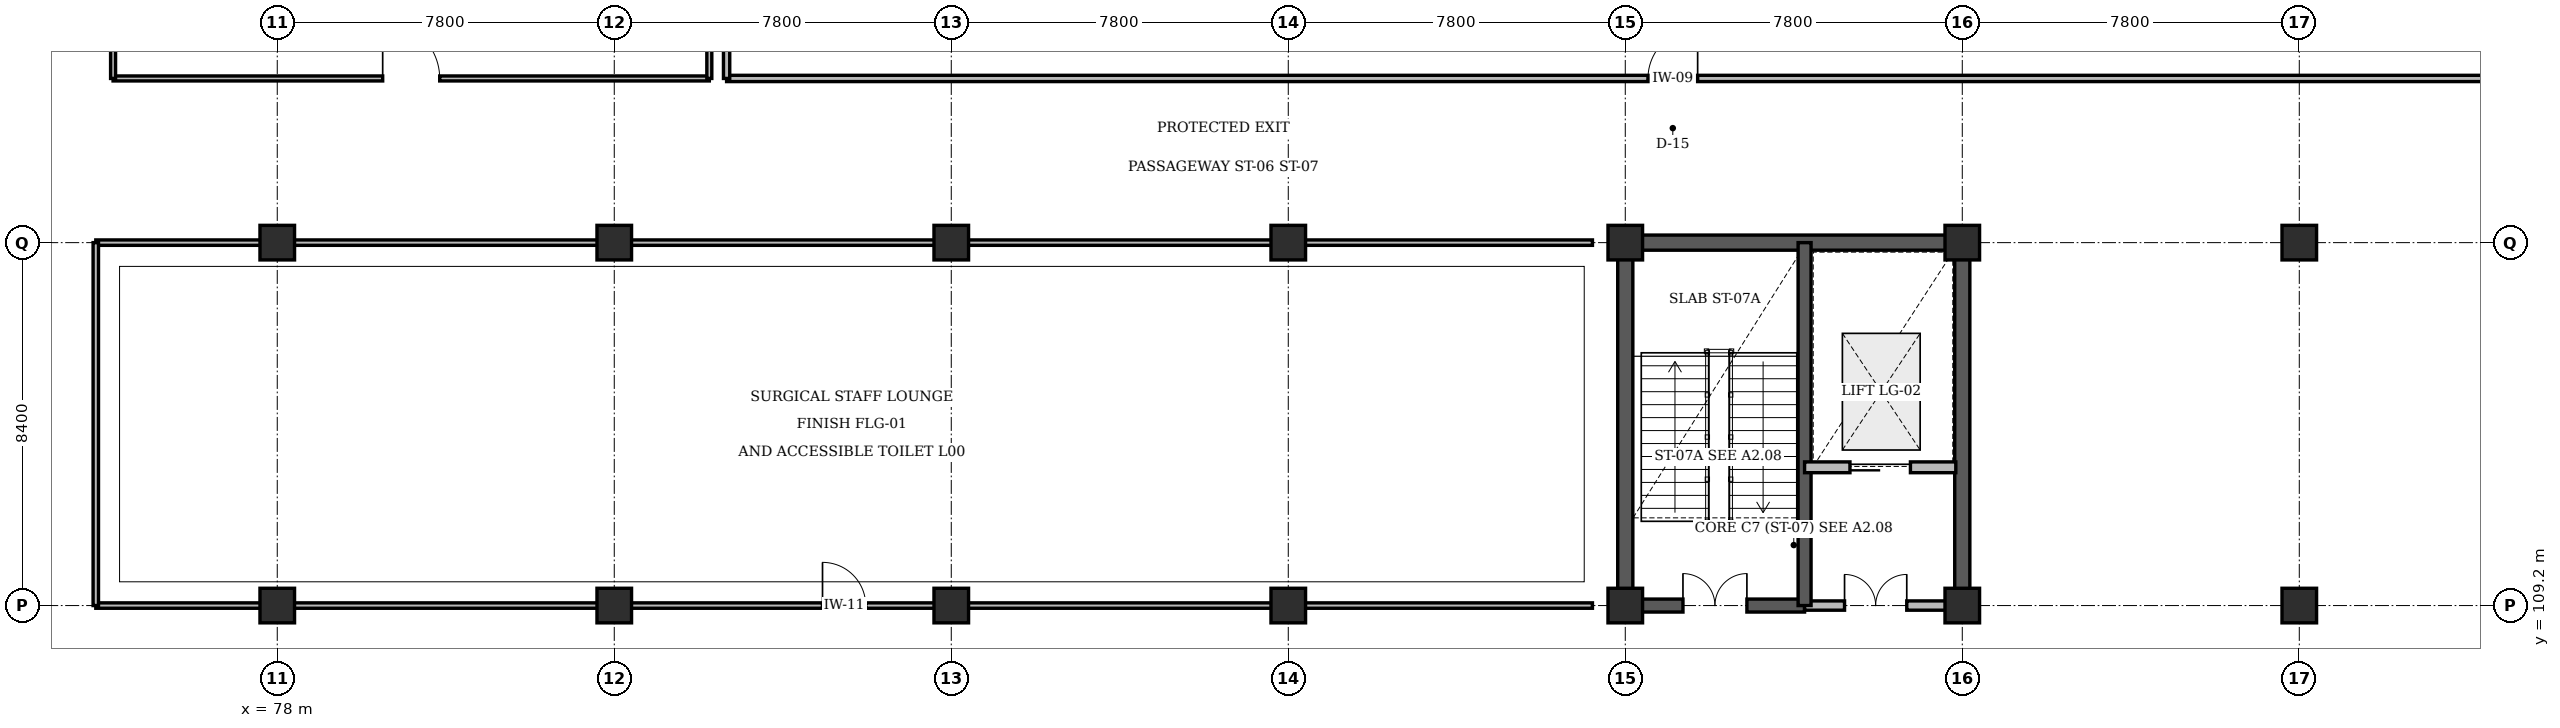
"""IFC4 building model, lengths in metres.
Left out: names, types, materials, properties, quantities, classifications, styles, units other than length and angle.
Written with IfcOpenShell. Run it as: python <this file> out.ifc"""

import sys

from ifc_helpers import new_model, si_unit, direction, frame, frame_2d, origin, origin_2d, place, context, subcontext, project, spatial, rectangle, extrude, element, fill, save


model = new_model("IFC4")
c1 = context("Model", 3, precision=1e-05, world=origin(), true_north=direction((0.0, 1.0)))
c2 = subcontext(c1, "Body", "Model", "MODEL_VIEW")
j1 = project(units=[si_unit("LENGTHUNIT", "METRE"), si_unit("PLANEANGLEUNIT", "RADIAN")], contexts=[c1])
p1 = place(None, origin())
s1 = spatial("IfcSite", under=j1, at=p1, CompositionType="ELEMENT")
p2 = place(p1, origin())
s2 = spatial("IfcBuilding", under=s1, at=p2, CompositionType="ELEMENT")
p3 = place(p2, origin())
s3 = spatial("IfcBuildingStorey", under=s2, at=p3, CompositionType="ELEMENT", Elevation=0.0)
p4 = place(p3, frame((109.025, 117.6, 0.0), z_axis=(0.0, 0.0, 1.0), x_axis=(1.0, 0.0, 0.0)))
e1 = element("IfcWall", 1, at=p4, inside=s3, PredefinedType="SHEAR", context=c2, shape_type="SweptSolid", body=[
    extrude(rectangle(XDim=8.15, YDim=0.35, at=frame_2d((4.075, 0.0))), origin(), (0.0, 0.0, 1.0), 4.48),
])
for number, where, z_axis, x_axis in (
    (2, (109.2, 109.2, 0.0), (0.0, 0.0, 1.0), (0.0, 1.0, 0.0)),
    (3, (117.0, 109.2, 0.0), (0.0, 0.0, 1.0), (0.0, 1.0, 0.0)),
):
    element("IfcWall", number, at=place(p3, frame(where, z_axis=z_axis, x_axis=x_axis)), inside=s3, PredefinedType="SHEAR", context=c2, shape_type="SweptSolid", body=[
        extrude(rectangle(XDim=8.4, YDim=0.35, at=frame_2d((4.2, 0.0))), origin(), (0.0, 0.0, 1.0), 4.48),
    ])
for number, where, z_axis, x_axis in (
    (4, (78.0, 109.2, 0.0), (0.0, 0.0, 1.0), (1.0, 0.0, 0.0)),
    (5, (78.0, 117.6, 0.0), (0.0, 0.0, 1.0), (1.0, 0.0, 0.0)),
    (6, (85.8, 109.2, 0.0), (0.0, 0.0, 1.0), (1.0, 0.0, 0.0)),
    (7, (85.8, 117.6, 0.0), (0.0, 0.0, 1.0), (1.0, 0.0, 0.0)),
    (8, (93.6, 109.2, 0.0), (0.0, 0.0, 1.0), (1.0, 0.0, 0.0)),
    (9, (93.6, 117.6, 0.0), (0.0, 0.0, 1.0), (1.0, 0.0, 0.0)),
    (10, (101.4, 109.2, 0.0), (0.0, 0.0, 1.0), (1.0, 0.0, 0.0)),
    (11, (101.4, 117.6, 0.0), (0.0, 0.0, 1.0), (1.0, 0.0, 0.0)),
    (12, (109.2, 109.2, 0.0), (0.0, 0.0, 1.0), (1.0, 0.0, 0.0)),
    (13, (109.2, 117.6, 0.0), (0.0, 0.0, 1.0), (1.0, 0.0, 0.0)),
    (14, (117.0, 109.2, 0.0), (0.0, 0.0, 1.0), (1.0, 0.0, 0.0)),
    (15, (117.0, 117.6, 0.0), (0.0, 0.0, 1.0), (1.0, 0.0, 0.0)),
    (16, (124.8, 109.2, 0.0), (0.0, 0.0, 1.0), (1.0, 0.0, 0.0)),
    (17, (124.8, 117.6, 0.0), (0.0, 0.0, 1.0), (1.0, 0.0, 0.0)),
):
    element("IfcColumn", number, at=place(p3, frame(where, z_axis=z_axis, x_axis=x_axis)), inside=s3, PredefinedType="COLUMN", context=c2, shape_type="SweptSolid", body=[
        extrude(rectangle(XDim=0.8, YDim=0.8, at=origin_2d()), origin(), (0.0, 0.0, 1.0), 4.8),
    ])
p5 = place(p3, frame((109.2, 109.2, 0.0), z_axis=(0.0, 0.0, 1.0), x_axis=(1.0, 0.0, 0.0)))
e18 = element("IfcWall", 18, at=p5, inside=s3, PredefinedType="SHEAR", context=c2, shape_type="SweptSolid", body=[
    extrude(rectangle(XDim=4.15, YDim=0.3, at=frame_2d((2.075, 0.0))), origin(), (0.0, 0.0, 1.0), 4.8),
])
p6 = place(p5, frame((1.335, 0.0, 0.0)))
e19 = element("IfcOpeningElement", 19, at=p6, cuts=e18, PredefinedType="OPENING", context=c2, shape_type="SweptSolid", body=[
    extrude(rectangle(XDim=1.48, YDim=2.2, at=frame_2d((0.74, 1.1))), frame((0.0, 0.16, 0.0), z_axis=(0.0, -1.0, 0.0), x_axis=(1.0, 0.0, 0.0)), (0.0, 0.0, 1.0), 0.32),
])
p7 = place(p3, frame((113.35, 109.2, 0.0), z_axis=(0.0, 0.0, 1.0), x_axis=(1.0, 0.0, 0.0)))
e20 = element("IfcWall", 20, at=p7, inside=s3, PredefinedType="STANDARD", context=c2, shape_type="SweptSolid", body=[
    extrude(rectangle(XDim=3.29, YDim=0.215, at=frame_2d((1.645, 0.0))), origin(), (0.0, 0.0, 1.0), 3.63),
])
p8 = place(p7, frame((0.925, 0.0, 0.0)))
e21 = element("IfcOpeningElement", 21, at=p8, cuts=e20, PredefinedType="OPENING", context=c2, shape_type="SweptSolid", body=[
    extrude(rectangle(XDim=1.44, YDim=2.2, at=frame_2d((0.72, 1.1))), frame((0.0, 0.118, 0.0), z_axis=(0.0, -1.0, 0.0), x_axis=(1.0, 0.0, 0.0)), (0.0, 0.0, 1.0), 0.235),
])
p9 = place(p3, frame((113.35, 109.2, 0.0), z_axis=(0.0, 0.0, 1.0), x_axis=(0.0, 1.0, 0.0)))
e22 = element("IfcWall", 22, at=p9, inside=s3, PredefinedType="SHEAR", context=c2, shape_type="SweptSolid", body=[
    extrude(rectangle(XDim=8.4, YDim=0.3, at=frame_2d((4.2, 0.0))), origin(), (0.0, 0.0, 1.0), 4.8),
])
p10 = place(p3, frame((113.35, 112.4, 0.0), z_axis=(0.0, 0.0, 1.0), x_axis=(1.0, 0.0, 0.0)))
e23 = element("IfcWall", 23, at=p10, inside=s3, PredefinedType="STANDARD", context=c2, shape_type="SweptSolid", body=[
    extrude(rectangle(XDim=3.5, YDim=0.25, at=frame_2d((1.75, 0.0))), origin(), (0.0, 0.0, 1.0), 4.46),
])
p11 = place(p10, frame((1.05, 0.0, 0.0)))
e24 = element("IfcOpeningElement", 24, at=p11, cuts=e23, PredefinedType="OPENING", context=c2, shape_type="SweptSolid", body=[
    extrude(rectangle(XDim=1.4, YDim=2.2, at=frame_2d((0.7, 1.1))), frame((0.0, 0.135, 0.0), z_axis=(0.0, -1.0, 0.0), x_axis=(1.0, 0.0, 0.0)), (0.0, 0.0, 1.0), 0.27),
])
p12 = place(p3, frame((73.8, 109.2, 0.0), z_axis=(0.0, 0.0, 1.0), x_axis=(1.0, 0.0, 0.0)))
e25 = element("IfcWall", 25, at=p12, inside=s3, PredefinedType="PARTITIONING", context=c2, shape_type="SweptSolid", body=[
    extrude(rectangle(XDim=34.64, YDim=0.125, at=frame_2d((17.32, 0.0))), origin(), (0.0, 0.0, 1.0), 3.63),
])
p13 = place(p12, frame((16.82, 0.0, 0.0)))
e26 = element("IfcOpeningElement", 26, at=p13, cuts=e25, PredefinedType="OPENING", context=c2, shape_type="SweptSolid", body=[
    extrude(rectangle(XDim=1.0, YDim=2.1, at=frame_2d((0.5, 1.05))), frame((0.0, 0.073, 0.0), z_axis=(0.0, -1.0, 0.0), x_axis=(1.0, 0.0, 0.0)), (0.0, 0.0, 1.0), 0.145),
])
p14 = place(p3, frame((73.8, 117.6, 0.0), z_axis=(0.0, 0.0, 1.0), x_axis=(1.0, 0.0, 0.0)))
e27 = element("IfcWall", 27, at=p14, inside=s3, PredefinedType="PARTITIONING", context=c2, shape_type="SweptSolid", body=[
    extrude(rectangle(XDim=34.64, YDim=0.125, at=frame_2d((17.32, 0.0))), origin(), (0.0, 0.0, 1.0), 3.63),
])
p15 = place(p3, frame((73.8, 109.2, 0.0), z_axis=(0.0, 0.0, 1.0), x_axis=(0.0, 1.0, 0.0)))
e28 = element("IfcWall", 28, at=p15, inside=s3, PredefinedType="PARTITIONING", context=c2, shape_type="SweptSolid", body=[
    extrude(rectangle(XDim=8.4, YDim=0.125, at=frame_2d((4.2, 0.0))), origin(), (0.0, 0.0, 1.0), 4.46),
])
p16 = place(p3, frame((74.2, 121.4, 0.0), z_axis=(0.0, 0.0, 1.0), x_axis=(1.0, 0.0, 0.0)))
e29 = element("IfcWall", 29, at=p16, inside=s3, PredefinedType="PARTITIONING", context=c2, shape_type="SweptSolid", body=[
    extrude(rectangle(XDim=13.8, YDim=0.115, at=frame_2d((6.9, 0.0))), origin(), (0.0, 0.0, 1.0), 4.46),
])
p17 = place(p16, frame((6.24, 0.0, 0.0)))
e30 = element("IfcOpeningElement", 30, at=p17, cuts=e29, PredefinedType="OPENING", context=c2, shape_type="SweptSolid", body=[
    extrude(rectangle(XDim=1.32, YDim=2.15, at=frame_2d((0.66, 1.075))), frame((0.0, 0.067, 0.0), z_axis=(0.0, -1.0, 0.0), x_axis=(1.0, 0.0, 0.0)), (0.0, 0.0, 1.0), 0.135),
])
for number, where, z_axis, x_axis in (
    (31, (74.2, 121.4, 0.0), (0.0, 0.0, 1.0), (0.0, 1.0, 0.0)),
    (32, (88.0, 121.4, 0.0), (0.0, 0.0, 1.0), (0.0, 1.0, 0.0)),
):
    element("IfcWall", number, at=place(p3, frame(where, z_axis=z_axis, x_axis=x_axis)), inside=s3, PredefinedType="PARTITIONING", context=c2, shape_type="SweptSolid", body=[
        extrude(rectangle(XDim=12.4, YDim=0.115, at=frame_2d((6.2, 0.0))), origin(), (0.0, 0.0, 1.0), 4.46),
    ])
p18 = place(p3, frame((88.4, 121.4, 0.0), z_axis=(0.0, 0.0, 1.0), x_axis=(1.0, 0.0, 0.0)))
e33 = element("IfcWall", 33, at=p18, inside=s3, PredefinedType="PARTITIONING", context=c2, shape_type="SweptSolid", body=[
    extrude(rectangle(XDim=43.8, YDim=0.145, at=frame_2d((21.9, 0.0))), origin(), (0.0, 0.0, 1.0), 4.46),
])
p19 = place(p18, frame((21.325, 0.0, 0.0)))
e34 = element("IfcOpeningElement", 34, at=p19, cuts=e33, PredefinedType="OPENING", context=c2, shape_type="SweptSolid", body=[
    extrude(rectangle(XDim=1.15, YDim=2.15, at=frame_2d((0.575, 1.075))), frame((0.0, 0.083, 0.0), z_axis=(0.0, -1.0, 0.0), x_axis=(1.0, 0.0, 0.0)), (0.0, 0.0, 1.0), 0.165),
])
p20 = place(p3, frame((88.4, 121.4, 0.0), z_axis=(0.0, 0.0, 1.0), x_axis=(0.0, 1.0, 0.0)))
e35 = element("IfcWall", 35, at=p20, inside=s3, PredefinedType="PARTITIONING", context=c2, shape_type="SweptSolid", body=[
    extrude(rectangle(XDim=12.4, YDim=0.145, at=frame_2d((6.2, 0.0))), origin(), (0.0, 0.0, 1.0), 4.46),
])
p21 = place(p6, origin())
e36 = element("IfcDoor", 36, at=p21, inside=s3, OperationType="DOUBLE_DOOR_SINGLE_SWING", PredefinedType="DOOR", context=c2, shape_type="SweptSolid", body=[
    extrude(rectangle(XDim=1.48, YDim=2.2, at=frame_2d((0.74, 1.1))), frame((0.0, 0.025, 0.0), z_axis=(0.0, -1.0, 0.0), x_axis=(1.0, 0.0, 0.0)), (0.0, 0.0, 1.0), 0.05),
])
fill(e19, e36)
p22 = place(p8, origin())
e37 = element("IfcDoor", 37, at=p22, inside=s3, OperationType="DOUBLE_DOOR_SINGLE_SWING", PredefinedType="DOOR", context=c2, shape_type="SweptSolid", body=[
    extrude(rectangle(XDim=1.44, YDim=2.2, at=frame_2d((0.72, 1.1))), frame((0.0, 0.025, 0.0), z_axis=(0.0, -1.0, 0.0), x_axis=(1.0, 0.0, 0.0)), (0.0, 0.0, 1.0), 0.05),
])
fill(e21, e37)
p23 = place(p11, origin())
e38 = element("IfcDoor", 38, at=p23, inside=s3, OperationType="SLIDING_TO_LEFT", PredefinedType="DOOR", context=c2, shape_type="SweptSolid", body=[
    extrude(rectangle(XDim=1.4, YDim=2.2, at=frame_2d((0.7, 1.1))), frame((0.0, 0.025, 0.0), z_axis=(0.0, -1.0, 0.0), x_axis=(1.0, 0.0, 0.0)), (0.0, 0.0, 1.0), 0.05),
])
fill(e24, e38)
p24 = place(p13, origin())
e39 = element("IfcDoor", 39, at=p24, inside=s3, OperationType="SINGLE_SWING_LEFT", PredefinedType="DOOR", context=c2, shape_type="SweptSolid", body=[
    extrude(rectangle(XDim=1.0, YDim=2.1, at=frame_2d((0.5, 1.05))), frame((0.0, 0.025, 0.0), z_axis=(0.0, -1.0, 0.0), x_axis=(1.0, 0.0, 0.0)), (0.0, 0.0, 1.0), 0.05),
])
fill(e26, e39)
p25 = place(p17, origin())
e40 = element("IfcDoor", 40, at=p25, inside=s3, OperationType="SINGLE_SWING_LEFT", PredefinedType="DOOR", context=c2, shape_type="SweptSolid", body=[
    extrude(rectangle(XDim=1.32, YDim=2.15, at=frame_2d((0.66, 1.075))), frame((0.0, 0.025, 0.0), z_axis=(0.0, -1.0, 0.0), x_axis=(1.0, 0.0, 0.0)), (0.0, 0.0, 1.0), 0.05),
])
fill(e30, e40)
p26 = place(p19, origin())
e41 = element("IfcDoor", 41, at=p26, inside=s3, OperationType="SINGLE_SWING_RIGHT", PredefinedType="DOOR", context=c2, shape_type="SweptSolid", body=[
    extrude(rectangle(XDim=1.15, YDim=2.15, at=frame_2d((0.575, 1.075))), frame((0.0, 0.025, 0.0), z_axis=(0.0, -1.0, 0.0), x_axis=(1.0, 0.0, 0.0)), (0.0, 0.0, 1.0), 0.05),
])
fill(e34, e41)
save(model, sys.argv[1])
